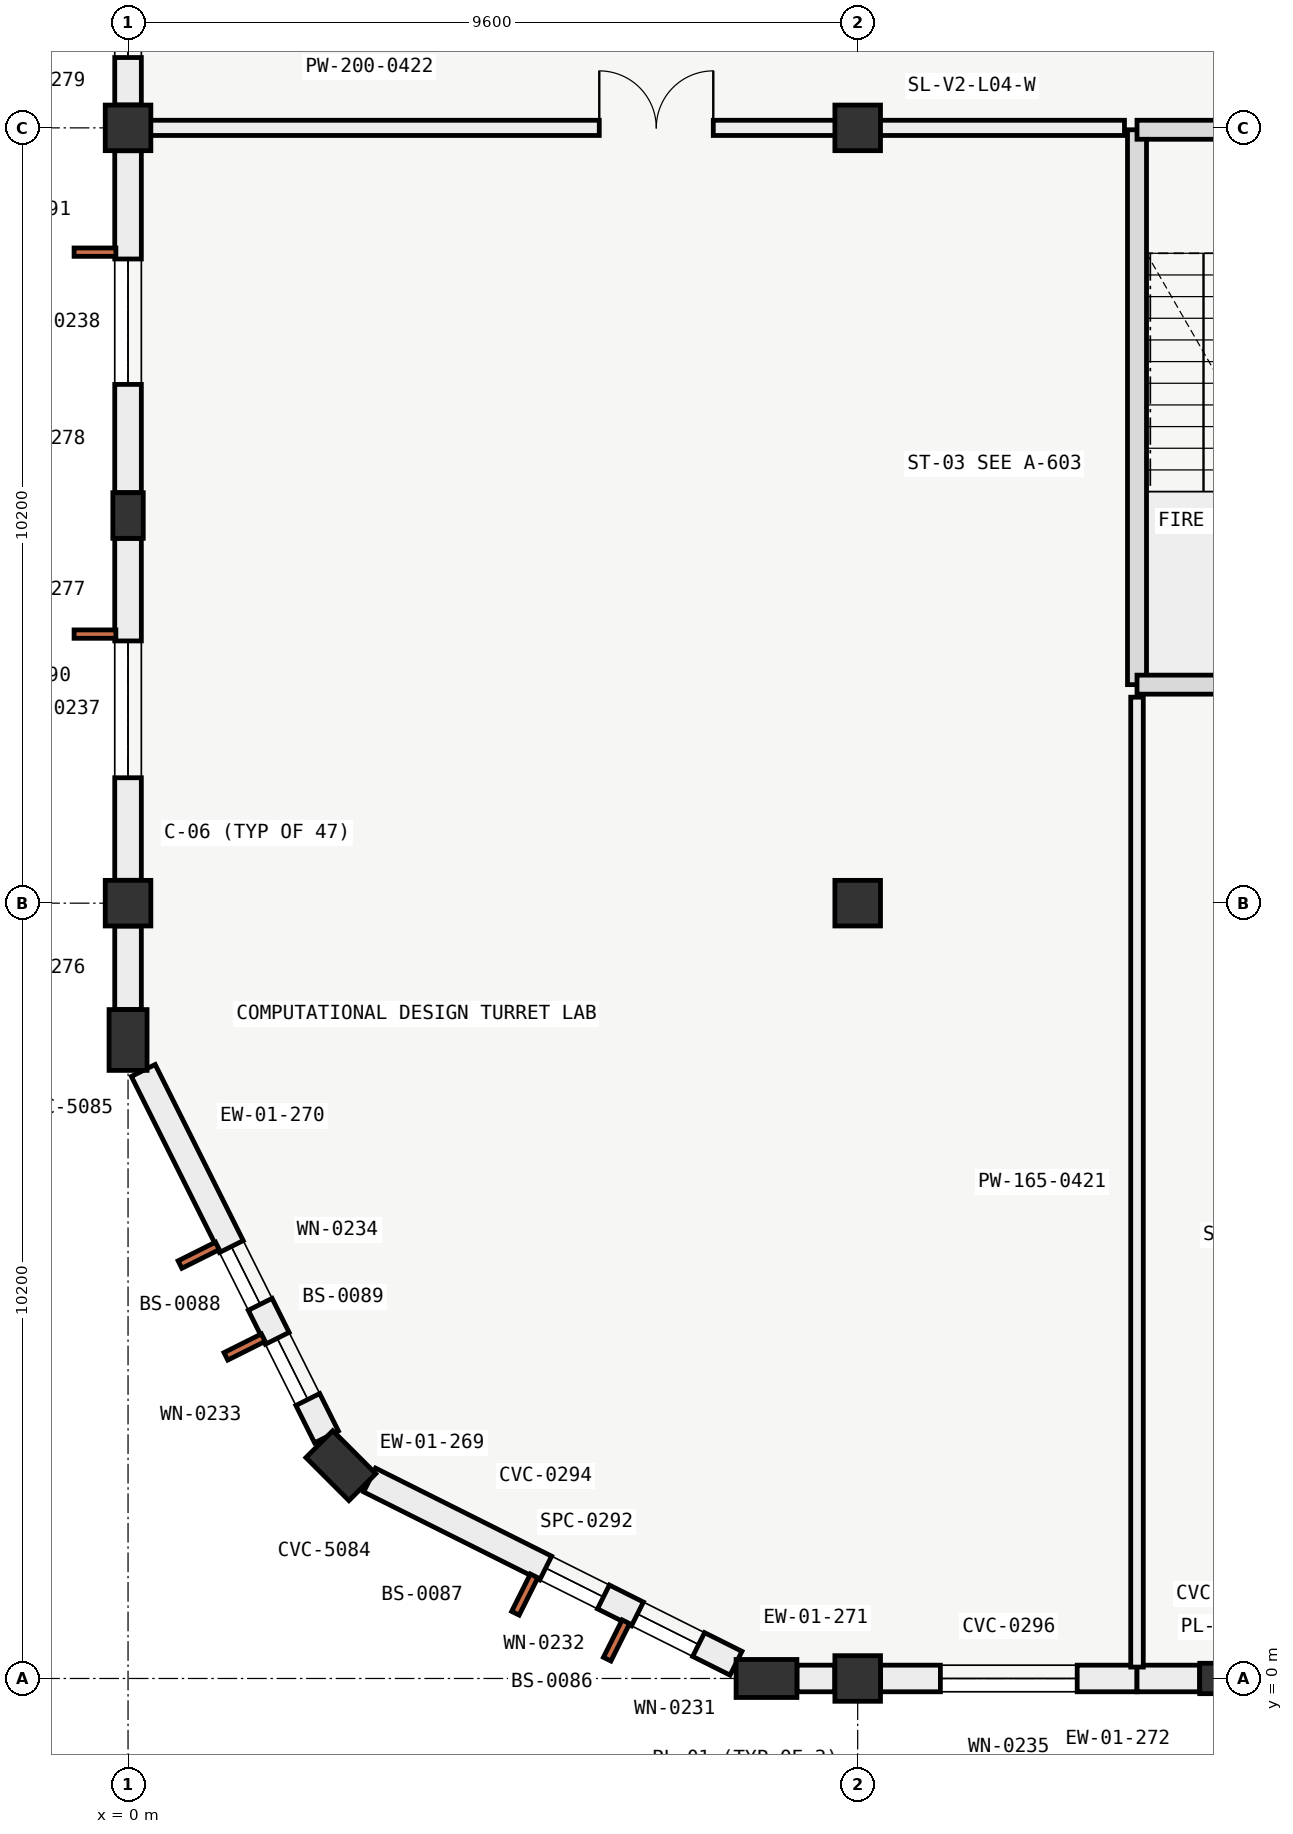
"""IFC4 building model, lengths in metres.
Left out: names, types, materials, properties, quantities, classifications, styles, units other than length and angle.
Written with IfcOpenShell. Run it as: python <this file> out.ifc"""

import sys

from ifc_helpers import new_model, si_unit, direction, frame, frame_2d, origin, origin_2d, place, context, subcontext, project, spatial, rectangle, extrude, element, fill, save


model = new_model("IFC4")
c1 = context("Model", 3, precision=1e-05, world=origin(), true_north=direction((0.0, 1.0)))
c2 = subcontext(c1, "Body", "Model", "MODEL_VIEW")
j1 = project(units=[si_unit("LENGTHUNIT", "METRE"), si_unit("PLANEANGLEUNIT", "RADIAN")], contexts=[c1])
p1 = place(None, origin())
s1 = spatial("IfcSite", under=j1, at=p1, CompositionType="ELEMENT")
p2 = place(p1, origin())
s2 = spatial("IfcBuilding", under=s1, at=p2, CompositionType="ELEMENT")
p3 = place(p2, frame((0.0, 0.0, 18.0)))
s3 = spatial("IfcBuildingStorey", under=s2, at=p3, CompositionType="ELEMENT", Elevation=18.0)
for number, where, z_axis, x_axis in (
    (1, (0.0, 10.2, 0.0), (0.0, 0.0, 1.0), (1.0, 0.0, 0.0)),
    (2, (0.0, 20.4, 0.0), (0.0, 0.0, 1.0), (1.0, 0.0, 0.0)),
    (3, (9.6, 0.0, 0.0), (0.0, 0.0, 1.0), (1.0, 0.0, 0.0)),
    (4, (9.6, 10.2, 0.0), (0.0, 0.0, 1.0), (1.0, 0.0, 0.0)),
    (5, (9.6, 20.4, 0.0), (0.0, 0.0, 1.0), (1.0, 0.0, 0.0)),
):
    element("IfcColumn", number, at=place(p3, frame(where, z_axis=z_axis, x_axis=x_axis)), inside=s3, PredefinedType="COLUMN", context=c2, shape_type="SweptSolid", body=[
        extrude(rectangle(XDim=0.6, YDim=0.6, at=origin_2d()), origin(), (0.0, 0.0, 1.0), 4.2),
    ])
for number, where, z_axis, x_axis in (
    (6, (8.4, 0.0, 0.0), (0.0, 0.0, 1.0), (0.0, 1.0, 0.0)),
    (7, (2.8, 2.8, 0.0), (0.0, 0.0, 1.0), (0.707, 0.707, 0.0)),
    (8, (0.0, 8.4, 0.0), (0.0, 0.0, 1.0), (1.0, 0.0, 0.0)),
):
    element("IfcColumn", number, at=place(p3, frame(where, z_axis=z_axis, x_axis=x_axis)), inside=s3, PredefinedType="PILASTER", context=c2, shape_type="SweptSolid", body=[
        extrude(rectangle(XDim=0.5, YDim=0.8, at=origin_2d()), origin(), (0.0, 0.0, 1.0), 4.2),
    ])
for number, where, z_axis, x_axis in (
    (9, (14.4, 0.0, 0.0), (0.0, 0.0, 1.0), (0.0, 1.0, 0.0)),
    (10, (0.0, 15.3, 0.0), (0.0, 0.0, 1.0), (1.0, 0.0, 0.0)),
):
    element("IfcColumn", number, at=place(p3, frame(where, z_axis=z_axis, x_axis=x_axis)), inside=s3, PredefinedType="PILASTER", context=c2, shape_type="SweptSolid", body=[
        extrude(rectangle(XDim=0.4, YDim=0.6, at=origin_2d()), origin(), (0.0, 0.0, 1.0), 4.2),
    ])
p4 = place(p3, frame((7.999, 0.2, 0.0), z_axis=(0.0, 0.0, 1.0), x_axis=(-0.894418132042, 0.447231712958, 0.0)))
e11 = element("IfcWall", 11, at=p4, inside=s3, PredefinedType="SOLIDWALL", context=c2, shape_type="SweptSolid", body=[
    extrude(rectangle(XDim=5.39, YDim=0.35, at=frame_2d((2.695, 0.0))), origin(), (0.0, 0.0, 1.0), 3.23),
])
p5 = place(p4, frame((0.55, 0.0, 0.7)))
e12 = element("IfcOpeningElement", 12, at=p5, cuts=e11, PredefinedType="OPENING", context=c2, shape_type="SweptSolid", body=[
    extrude(rectangle(XDim=0.9, YDim=2.2, at=frame_2d((0.45, 1.1))), frame((0.0, 0.185, 0.0), z_axis=(0.0, -1.0, 0.0), x_axis=(1.0, 0.0, 0.0)), (0.0, 0.0, 1.0), 0.37),
])
p6 = place(p4, frame((1.95, 0.0, 0.7)))
e13 = element("IfcOpeningElement", 13, at=p6, cuts=e11, PredefinedType="OPENING", context=c2, shape_type="SweptSolid", body=[
    extrude(rectangle(XDim=0.85, YDim=2.1, at=frame_2d((0.425, 1.05))), frame((0.0, 0.185, 0.0), z_axis=(0.0, -1.0, 0.0), x_axis=(1.0, 0.0, 0.0)), (0.0, 0.0, 1.0), 0.37),
])
p7 = place(p3, frame((2.611, 3.178, 0.0), z_axis=(0.0, 0.0, 1.0), x_axis=(-0.447231712958, 0.894418132042, 0.0)))
e14 = element("IfcWall", 14, at=p7, inside=s3, PredefinedType="SOLIDWALL", context=c2, shape_type="SweptSolid", body=[
    extrude(rectangle(XDim=5.39, YDim=0.35, at=frame_2d((2.695, 0.0))), origin(), (0.0, 0.0, 1.0), 3.23),
])
p8 = place(p7, frame((0.55, 0.0, 0.7)))
e15 = element("IfcOpeningElement", 15, at=p8, cuts=e14, PredefinedType="OPENING", context=c2, shape_type="SweptSolid", body=[
    extrude(rectangle(XDim=0.9, YDim=2.2, at=frame_2d((0.45, 1.1))), frame((0.0, 0.185, 0.0), z_axis=(0.0, -1.0, 0.0), x_axis=(1.0, 0.0, 0.0)), (0.0, 0.0, 1.0), 0.37),
])
p9 = place(p7, frame((1.95, 0.0, 0.7)))
e16 = element("IfcOpeningElement", 16, at=p9, cuts=e14, PredefinedType="OPENING", context=c2, shape_type="SweptSolid", body=[
    extrude(rectangle(XDim=0.85, YDim=2.1, at=frame_2d((0.425, 1.05))), frame((0.0, 0.185, 0.0), z_axis=(0.0, -1.0, 0.0), x_axis=(1.0, 0.0, 0.0)), (0.0, 0.0, 1.0), 0.37),
])
p10 = place(p3, frame((9.299, 0.0, 0.0), z_axis=(0.0, 0.0, 1.0), x_axis=(-1.0, 0.0, 0.0)))
e17 = element("IfcWall", 17, at=p10, inside=s3, PredefinedType="SOLIDWALL", context=c2, shape_type="SweptSolid", body=[
    extrude(rectangle(XDim=0.498, YDim=0.35, at=frame_2d((0.249, 0.0))), origin(), (0.0, 0.0, 1.0), 3.25),
])
p11 = place(p3, frame((13.275, 0.0, 0.0), z_axis=(0.0, 0.0, 1.0), x_axis=(-1.0, 0.0, 0.0)))
e18 = element("IfcWall", 18, at=p11, inside=s3, PredefinedType="SOLIDWALL", context=c2, shape_type="SweptSolid", body=[
    extrude(rectangle(XDim=3.374, YDim=0.35, at=frame_2d((1.687, 0.0))), origin(), (0.0, 0.0, 1.0), 3.25),
])
p12 = place(p11, frame((0.787, 0.0, 0.8)))
e19 = element("IfcOpeningElement", 19, at=p12, cuts=e18, PredefinedType="OPENING", context=c2, shape_type="SweptSolid", body=[
    extrude(rectangle(XDim=1.8, YDim=2.1, at=frame_2d((0.9, 1.05))), frame((0.0, 0.185, 0.0), z_axis=(0.0, -1.0, 0.0), x_axis=(1.0, 0.0, 0.0)), (0.0, 0.0, 1.0), 0.37),
])
p13 = place(p3, frame((14.099, 0.0, 0.0), z_axis=(0.0, 0.0, 1.0), x_axis=(-1.0, 0.0, 0.0)))
e20 = element("IfcWall", 20, at=p13, inside=s3, PredefinedType="SOLIDWALL", context=c2, shape_type="SweptSolid", body=[
    extrude(rectangle(XDim=0.824, YDim=0.35, at=frame_2d((0.412, 0.0))), origin(), (0.0, 0.0, 1.0), 3.25),
])
p14 = place(p3, frame((0.0, 8.801, 0.0), z_axis=(0.0, 0.0, 1.0), x_axis=(0.0, 1.0, 0.0)))
e21 = element("IfcWall", 21, at=p14, inside=s3, PredefinedType="SOLIDWALL", context=c2, shape_type="SweptSolid", body=[
    extrude(rectangle(XDim=1.098, YDim=0.35, at=frame_2d((0.549, 0.0))), origin(), (0.0, 0.0, 1.0), 3.25),
])
p15 = place(p3, frame((0.0, 10.501, 0.0), z_axis=(0.0, 0.0, 1.0), x_axis=(0.0, 1.0, 0.0)))
e22 = element("IfcWall", 22, at=p15, inside=s3, PredefinedType="SOLIDWALL", context=c2, shape_type="SweptSolid", body=[
    extrude(rectangle(XDim=4.498, YDim=0.35, at=frame_2d((2.249, 0.0))), origin(), (0.0, 0.0, 1.0), 3.25),
])
p16 = place(p15, frame((1.349, 0.0, 0.85)))
e23 = element("IfcOpeningElement", 23, at=p16, cuts=e22, PredefinedType="OPENING", context=c2, shape_type="SweptSolid", body=[
    extrude(rectangle(XDim=1.8, YDim=2.1, at=frame_2d((0.9, 1.05))), frame((0.0, 0.185, 0.0), z_axis=(0.0, -1.0, 0.0), x_axis=(1.0, 0.0, 0.0)), (0.0, 0.0, 1.0), 0.37),
])
p17 = place(p3, frame((0.0, 15.601, 0.0), z_axis=(0.0, 0.0, 1.0), x_axis=(0.0, 1.0, 0.0)))
e24 = element("IfcWall", 24, at=p17, inside=s3, PredefinedType="SOLIDWALL", context=c2, shape_type="SweptSolid", body=[
    extrude(rectangle(XDim=4.498, YDim=0.35, at=frame_2d((2.249, 0.0))), origin(), (0.0, 0.0, 1.0), 3.25),
])
p18 = place(p17, frame((1.424, 0.0, 0.85)))
e25 = element("IfcOpeningElement", 25, at=p18, cuts=e24, PredefinedType="OPENING", context=c2, shape_type="SweptSolid", body=[
    extrude(rectangle(XDim=1.65, YDim=2.0, at=frame_2d((0.825, 1.0))), frame((0.0, 0.185, 0.0), z_axis=(0.0, -1.0, 0.0), x_axis=(1.0, 0.0, 0.0)), (0.0, 0.0, 1.0), 0.37),
])
p19 = place(p3, frame((0.0, 20.701, 0.0), z_axis=(0.0, 0.0, 1.0), x_axis=(0.0, 1.0, 0.0)))
e26 = element("IfcWall", 26, at=p19, inside=s3, PredefinedType="SOLIDWALL", context=c2, shape_type="SweptSolid", body=[
    extrude(rectangle(XDim=3.249, YDim=0.35, at=frame_2d((1.625, 0.0))), origin(), (0.0, 0.0, 1.0), 3.25),
])
p20 = place(p19, frame((0.625, 0.0, 0.75)))
e27 = element("IfcOpeningElement", 27, at=p20, cuts=e26, PredefinedType="OPENING", context=c2, shape_type="SweptSolid", body=[
    extrude(rectangle(XDim=2.0, YDim=1.35, at=frame_2d((1.0, 0.675))), frame((0.0, 0.185, 0.0), z_axis=(0.0, -1.0, 0.0), x_axis=(1.0, 0.0, 0.0)), (0.0, 0.0, 1.0), 0.37),
])
p21 = place(p3, frame((13.275, 20.375, 0.0), z_axis=(0.0, 0.0, 1.0), x_axis=(0.0, -1.0, 0.0)))
e28 = element("IfcWall", 28, at=p21, inside=s3, PredefinedType="SOLIDWALL", context=c2, shape_type="SweptSolid", body=[
    extrude(rectangle(XDim=7.3, YDim=0.25, at=frame_2d((3.65, 0.0))), origin(), (0.0, 0.0, 1.0), 3.95),
])
p22 = place(p3, frame((13.275, 13.075, 0.0), z_axis=(0.0, 0.0, 1.0), x_axis=(1.0, 0.0, 0.0)))
e29 = element("IfcWall", 29, at=p22, inside=s3, PredefinedType="SOLIDWALL", context=c2, shape_type="SweptSolid", body=[
    extrude(rectangle(XDim=3.45, YDim=0.25, at=frame_2d((1.725, 0.0))), origin(), (0.0, 0.0, 1.0), 3.95),
])
p23 = place(p3, frame((16.725, 20.375, 0.0), z_axis=(0.0, 0.0, 1.0), x_axis=(-1.0, 0.0, 0.0)))
e30 = element("IfcWall", 30, at=p23, inside=s3, PredefinedType="SOLIDWALL", context=c2, shape_type="SweptSolid", body=[
    extrude(rectangle(XDim=3.45, YDim=0.25, at=frame_2d((1.725, 0.0))), origin(), (0.0, 0.0, 1.0), 3.95),
])
p24 = place(p23, frame((1.175, 0.0, 0.0)))
e31 = element("IfcOpeningElement", 31, at=p24, cuts=e30, PredefinedType="OPENING", context=c2, shape_type="SweptSolid", body=[
    extrude(rectangle(XDim=1.1, YDim=2.2, at=frame_2d((0.55, 1.1))), frame((0.0, 0.135, 0.0), z_axis=(0.0, -1.0, 0.0), x_axis=(1.0, 0.0, 0.0)), (0.0, 0.0, 1.0), 0.27),
])
p25 = place(p3, frame((13.275, 0.15, 0.0), z_axis=(0.0, 0.0, 1.0), x_axis=(0.0, 1.0, 0.0)))
e32 = element("IfcWall", 32, at=p25, inside=s3, PredefinedType="PARTITIONING", context=c2, shape_type="SweptSolid", body=[
    extrude(rectangle(XDim=12.76, YDim=0.165, at=frame_2d((6.38, 0.0))), origin(), (0.0, 0.0, 1.0), 3.33),
])
p26 = place(p3, frame((0.15, 20.4, 0.0), z_axis=(0.0, 0.0, 1.0), x_axis=(1.0, 0.0, 0.0)))
e33 = element("IfcWall", 33, at=p26, inside=s3, PredefinedType="PARTITIONING", context=c2, shape_type="SweptSolid", body=[
    extrude(rectangle(XDim=12.96, YDim=0.2, at=frame_2d((6.48, 0.0))), origin(), (0.0, 0.0, 1.0), 3.28),
])
p27 = place(p26, frame((6.05, 0.0, 0.0)))
e34 = element("IfcOpeningElement", 34, at=p27, cuts=e33, PredefinedType="OPENING", context=c2, shape_type="SweptSolid", body=[
    extrude(rectangle(XDim=1.5, YDim=2.2, at=frame_2d((0.75, 1.1))), frame((0.0, 0.11, 0.0), z_axis=(0.0, -1.0, 0.0), x_axis=(1.0, 0.0, 0.0)), (0.0, 0.0, 1.0), 0.22),
])
p28 = place(p5, origin())
e35 = element("IfcWindow", 35, at=p28, inside=s3, PartitioningType="SINGLE_PANEL", PredefinedType="WINDOW", context=c2, shape_type="SweptSolid", body=[
    extrude(rectangle(XDim=0.9, YDim=2.2, at=frame_2d((0.45, 1.1))), frame((0.0, 0.03, 0.0), z_axis=(0.0, -1.0, 0.0), x_axis=(1.0, 0.0, 0.0)), (0.0, 0.0, 1.0), 0.06),
])
fill(e12, e35)
p29 = place(p6, origin())
e36 = element("IfcWindow", 36, at=p29, inside=s3, PartitioningType="SINGLE_PANEL", PredefinedType="WINDOW", context=c2, shape_type="SweptSolid", body=[
    extrude(rectangle(XDim=0.85, YDim=2.1, at=frame_2d((0.425, 1.05))), frame((0.0, 0.03, 0.0), z_axis=(0.0, -1.0, 0.0), x_axis=(1.0, 0.0, 0.0)), (0.0, 0.0, 1.0), 0.06),
])
fill(e13, e36)
p30 = place(p8, origin())
e37 = element("IfcWindow", 37, at=p30, inside=s3, PartitioningType="SINGLE_PANEL", PredefinedType="WINDOW", context=c2, shape_type="SweptSolid", body=[
    extrude(rectangle(XDim=0.9, YDim=2.2, at=frame_2d((0.45, 1.1))), frame((0.0, 0.03, 0.0), z_axis=(0.0, -1.0, 0.0), x_axis=(1.0, 0.0, 0.0)), (0.0, 0.0, 1.0), 0.06),
])
fill(e15, e37)
p31 = place(p9, origin())
e38 = element("IfcWindow", 38, at=p31, inside=s3, PartitioningType="SINGLE_PANEL", PredefinedType="WINDOW", context=c2, shape_type="SweptSolid", body=[
    extrude(rectangle(XDim=0.85, YDim=2.1, at=frame_2d((0.425, 1.05))), frame((0.0, 0.03, 0.0), z_axis=(0.0, -1.0, 0.0), x_axis=(1.0, 0.0, 0.0)), (0.0, 0.0, 1.0), 0.06),
])
fill(e16, e38)
p32 = place(p12, origin())
e39 = element("IfcWindow", 39, at=p32, inside=s3, PartitioningType="SINGLE_PANEL", PredefinedType="WINDOW", context=c2, shape_type="SweptSolid", body=[
    extrude(rectangle(XDim=1.8, YDim=2.1, at=frame_2d((0.9, 1.05))), frame((0.0, 0.03, 0.0), z_axis=(0.0, -1.0, 0.0), x_axis=(1.0, 0.0, 0.0)), (0.0, 0.0, 1.0), 0.06),
])
fill(e19, e39)
p33 = place(p16, origin())
e40 = element("IfcWindow", 40, at=p33, inside=s3, PartitioningType="SINGLE_PANEL", PredefinedType="WINDOW", context=c2, shape_type="SweptSolid", body=[
    extrude(rectangle(XDim=1.8, YDim=2.1, at=frame_2d((0.9, 1.05))), frame((0.0, 0.03, 0.0), z_axis=(0.0, -1.0, 0.0), x_axis=(1.0, 0.0, 0.0)), (0.0, 0.0, 1.0), 0.06),
])
fill(e23, e40)
p34 = place(p18, origin())
e41 = element("IfcWindow", 41, at=p34, inside=s3, PartitioningType="SINGLE_PANEL", PredefinedType="WINDOW", context=c2, shape_type="SweptSolid", body=[
    extrude(rectangle(XDim=1.65, YDim=2.0, at=frame_2d((0.825, 1.0))), frame((0.0, 0.03, 0.0), z_axis=(0.0, -1.0, 0.0), x_axis=(1.0, 0.0, 0.0)), (0.0, 0.0, 1.0), 0.06),
])
fill(e25, e41)
p35 = place(p20, origin())
e42 = element("IfcWindow", 42, at=p35, inside=s3, PartitioningType="SINGLE_PANEL", PredefinedType="WINDOW", context=c2, shape_type="SweptSolid", body=[
    extrude(rectangle(XDim=2.0, YDim=1.35, at=frame_2d((1.0, 0.675))), frame((0.0, 0.03, 0.0), z_axis=(0.0, -1.0, 0.0), x_axis=(1.0, 0.0, 0.0)), (0.0, 0.0, 1.0), 0.06),
])
fill(e27, e42)
p36 = place(p27, origin())
e43 = element("IfcDoor", 43, at=p36, inside=s3, OperationType="DOUBLE_DOOR_SINGLE_SWING", PredefinedType="DOOR", context=c2, shape_type="SweptSolid", body=[
    extrude(rectangle(XDim=1.5, YDim=2.2, at=frame_2d((0.75, 1.1))), frame((0.0, 0.025, 0.0), z_axis=(0.0, -1.0, 0.0), x_axis=(1.0, 0.0, 0.0)), (0.0, 0.0, 1.0), 0.05),
])
fill(e34, e43)
save(model, sys.argv[1])
